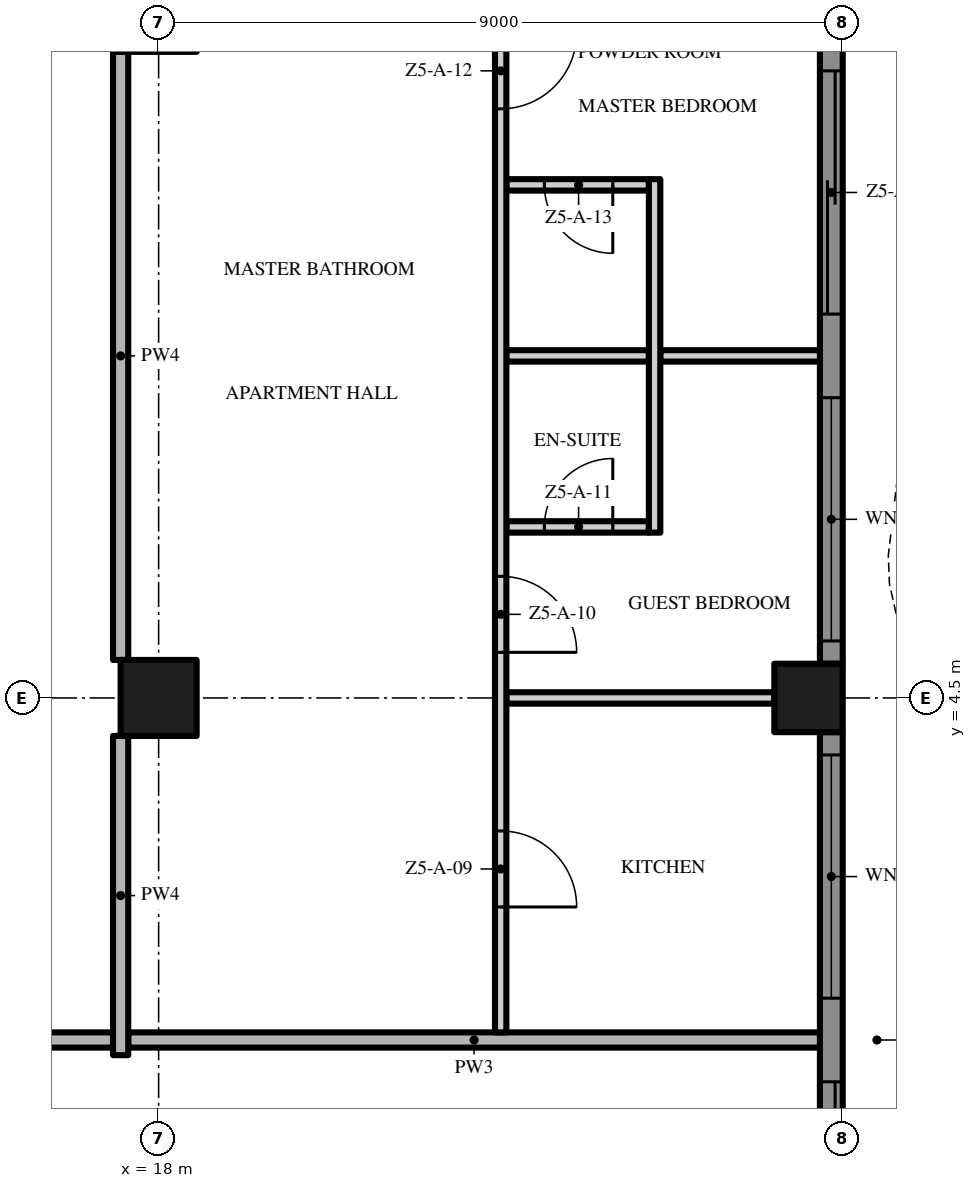
"""IFC4 building model, lengths in metres.
Left out: names, types, materials, properties, quantities, classifications, styles, units other than length and angle.
Written with IfcOpenShell. Run it as: python <this file> out.ifc"""

import sys

from ifc_helpers import new_model, si_unit, direction, frame, frame_2d, origin, origin_2d, place, context, subcontext, project, spatial, polyline, rectangle, outline, extrude, element, fill, save


model = new_model("IFC4")
c1 = context("Model", 3, precision=1e-05, world=origin(), true_north=direction((0.0, 1.0)))
c2 = subcontext(c1, "Body", "Model", "MODEL_VIEW")
j1 = project(units=[si_unit("LENGTHUNIT", "METRE"), si_unit("PLANEANGLEUNIT", "RADIAN")], contexts=[c1])
p1 = place(None, origin())
s1 = spatial("IfcSite", under=j1, at=p1, CompositionType="ELEMENT")
p2 = place(p1, origin())
s2 = spatial("IfcBuilding", under=s1, at=p2, CompositionType="ELEMENT")
p3 = place(p2, frame((0.0, 0.0, 246.4)))
s3 = spatial("IfcBuildingStorey", under=s2, at=p3, CompositionType="ELEMENT", Elevation=246.4)
p4 = place(p3, frame((18.0, 4.5, 0.0), z_axis=(0.0, 0.0, 1.0), x_axis=(1.0, 0.0, 0.0)))
e1 = element("IfcColumn", 1, at=p4, inside=s3, PredefinedType="COLUMN", context=c2, shape_type="SweptSolid", body=[
    extrude(rectangle(XDim=1.0, YDim=1.0, at=origin_2d()), origin(), (0.0, 0.0, 1.0), 3.5),
])
p5 = place(p3, frame((26.55, 4.5, 0.0), z_axis=(0.0, 0.0, 1.0), x_axis=(1.0, 0.0, 0.0)))
e2 = element("IfcColumn", 2, at=p5, inside=s3, PredefinedType="COLUMN", context=c2, shape_type="SweptSolid", body=[
    extrude(rectangle(XDim=0.9, YDim=0.9, at=origin_2d()), origin(), (0.0, 0.0, 1.0), 3.5),
])
p6 = place(p3, frame((26.85, 4.05, 0.0), z_axis=(0.0, 0.0, 1.0), x_axis=(0.0, -1.0, 0.0)))
e3 = element("IfcWall", 3, at=p6, inside=s3, PredefinedType="SOLIDWALL", context=c2, shape_type="SweptSolid", body=[
    extrude(rectangle(XDim=8.1, YDim=0.3, at=frame_2d((4.05, 0.0))), origin(), (0.0, 0.0, 1.0), 3.5),
])
p7 = place(p6, frame((4.6, 0.0, 0.0)))
e4 = element("IfcOpeningElement", 4, at=p7, cuts=e3, PredefinedType="OPENING", context=c2, shape_type="SweptSolid", body=[
    extrude(rectangle(XDim=3.2, YDim=2.4, at=frame_2d((1.6, 1.2))), frame((0.0, 0.16, 0.0), z_axis=(0.0, -1.0, 0.0), x_axis=(1.0, 0.0, 0.0)), (0.0, 0.0, 1.0), 0.32),
])
p8 = place(p6, frame((0.3, 0.0, 0.45)))
e5 = element("IfcOpeningElement", 5, at=p8, cuts=e3, PredefinedType="OPENING", context=c2, shape_type="SweptSolid", body=[
    extrude(rectangle(XDim=3.2, YDim=2.65, at=frame_2d((1.6, 1.325))), frame((0.0, 0.16, 0.0), z_axis=(0.0, -1.0, 0.0), x_axis=(1.0, 0.0, 0.0)), (0.0, 0.0, 1.0), 0.32),
])
p9 = place(p3, frame((26.85, 13.05, 0.0), z_axis=(0.0, 0.0, 1.0), x_axis=(0.0, -1.0, 0.0)))
e6 = element("IfcWall", 6, at=p9, inside=s3, PredefinedType="SOLIDWALL", context=c2, shape_type="SweptSolid", body=[
    extrude(rectangle(XDim=8.1, YDim=0.3, at=frame_2d((4.05, 0.0))), origin(), (0.0, 0.0, 1.0), 3.5),
])
p10 = place(p9, frame((4.6, 0.0, 0.45)))
e7 = element("IfcOpeningElement", 7, at=p10, cuts=e6, PredefinedType="OPENING", context=c2, shape_type="SweptSolid", body=[
    extrude(rectangle(XDim=3.2, YDim=2.65, at=frame_2d((1.6, 1.325))), frame((0.0, 0.16, 0.0), z_axis=(0.0, -1.0, 0.0), x_axis=(1.0, 0.0, 0.0)), (0.0, 0.0, 1.0), 0.32),
])
p11 = place(p9, frame((0.3, 0.0, 0.0)))
e8 = element("IfcOpeningElement", 8, at=p11, cuts=e6, PredefinedType="OPENING", context=c2, shape_type="SweptSolid", body=[
    extrude(rectangle(XDim=3.2, YDim=2.4, at=frame_2d((1.6, 1.2))), frame((0.0, 0.16, 0.0), z_axis=(0.0, -1.0, 0.0), x_axis=(1.0, 0.0, 0.0)), (0.0, 0.0, 1.0), 0.32),
])
p12 = place(p3, origin())
e9 = element("IfcWall", 9, at=p12, inside=s3, PredefinedType="USERDEFINED", context=c2, shape_type="SweptSolid", body=[
    extrude(outline(polyline([(29.649, -18.0), (29.985, -16.5), (30.0, -16.125), (29.869, -15.0), (29.345, -13.5), (28.612, -12.0), (27.951, -10.5), (27.615, -9.0), (27.6, -8.625), (27.731, -7.5), (28.255, -6.0), (28.988, -4.5), (29.649, -3.0), (29.985, -1.5), (30.0, -1.125), (29.869, 0.0), (29.345, 1.5), (28.612, 3.0), (27.951, 4.5), (27.615, 6.0), (27.6, 6.375), (27.731, 7.5), (28.255, 9.0), (28.988, 10.5), (29.649, 12.0), (29.985, 13.5), (30.0, 13.875), (29.869, 15.0), (29.345, 16.5), (28.612, 18.0), (28.388, 17.89), (29.114, 16.404), (29.624, 14.944), (29.749, 13.865), (29.736, 13.533), (29.41, 12.079), (28.761, 10.605), (28.024, 9.096), (27.486, 7.556), (27.349, 6.385), (27.366, 5.967), (27.713, 4.421), (28.385, 2.895), (29.114, 1.404), (29.624, -0.056), (29.749, -1.135), (29.736, -1.467), (29.41, -2.921), (28.761, -4.395), (28.024, -5.904), (27.486, -7.444), (27.349, -8.615), (27.366, -9.033), (27.713, -10.579), (28.385, -12.105), (29.114, -13.596), (29.624, -15.056), (29.749, -16.135), (29.736, -16.467), (29.405, -17.945), (29.649, -18.0)])), origin(), (0.0, 0.0, 1.0), 0.9),
])
p13 = place(p3, frame((17.4, 0.0, 0.0), z_axis=(0.0, 0.0, 1.0), x_axis=(-1.0, 0.0, 0.0)))
e10 = element("IfcWall", 10, at=p13, inside=s3, PredefinedType="PARTITIONING", context=c2, shape_type="SweptSolid", body=[
    extrude(rectangle(XDim=34.8, YDim=0.2, at=frame_2d((17.4, 0.0))), origin(), (0.0, 0.0, 1.0), 3.5),
])
p14 = place(p13, frame((25.65, 0.0, 0.0)))
e11 = element("IfcOpeningElement", 11, at=p14, cuts=e10, PredefinedType="OPENING", context=c2, shape_type="SweptSolid", body=[
    extrude(rectangle(XDim=1.5, YDim=2.4, at=frame_2d((0.75, 1.2))), frame((0.0, 0.11, 0.0), z_axis=(0.0, -1.0, 0.0), x_axis=(1.0, 0.0, 0.0)), (0.0, 0.0, 1.0), 0.22),
])
p15 = place(p13, frame((7.65, 0.0, 0.0)))
e12 = element("IfcOpeningElement", 12, at=p15, cuts=e10, PredefinedType="OPENING", context=c2, shape_type="SweptSolid", body=[
    extrude(rectangle(XDim=1.5, YDim=2.4, at=frame_2d((0.75, 1.2))), frame((0.0, 0.11, 0.0), z_axis=(0.0, -1.0, 0.0), x_axis=(1.0, 0.0, 0.0)), (0.0, 0.0, 1.0), 0.22),
])
p16 = place(p3, frame((17.6, 0.0, 0.0), z_axis=(0.0, 0.0, 1.0), x_axis=(1.0, 0.0, 0.0)))
e13 = element("IfcWall", 13, at=p16, inside=s3, PredefinedType="PARTITIONING", context=c2, shape_type="SweptSolid", body=[
    extrude(rectangle(XDim=9.1, YDim=0.2, at=frame_2d((4.55, 0.0))), origin(), (0.0, 0.0, 1.0), 3.5),
])
p17 = place(p3, frame((22.575, 4.5, 0.0), z_axis=(0.0, 0.0, 1.0), x_axis=(1.0, 0.0, 0.0)))
e14 = element("IfcWall", 14, at=p17, inside=s3, PredefinedType="PARTITIONING", context=c2, shape_type="SweptSolid", body=[
    extrude(rectangle(XDim=3.525, YDim=0.15, at=frame_2d((1.762, 0.0))), origin(), (0.0, 0.0, 1.0), 3.5),
])
p18 = place(p3, frame((22.575, 6.75, 0.0), z_axis=(0.0, 0.0, 1.0), x_axis=(1.0, 0.0, 0.0)))
e15 = element("IfcWall", 15, at=p18, inside=s3, PredefinedType="PARTITIONING", context=c2, shape_type="SweptSolid", body=[
    extrude(rectangle(XDim=1.875, YDim=0.15, at=frame_2d((0.938, 0.0))), origin(), (0.0, 0.0, 1.0), 3.5),
])
p19 = place(p18, frame((0.5, 0.0, 0.0)))
e16 = element("IfcOpeningElement", 16, at=p19, cuts=e15, PredefinedType="OPENING", context=c2, shape_type="SweptSolid", body=[
    extrude(rectangle(XDim=0.9, YDim=2.1, at=frame_2d((0.45, 1.05))), frame((0.0, 0.085, 0.0), z_axis=(0.0, -1.0, 0.0), x_axis=(1.0, 0.0, 0.0)), (0.0, 0.0, 1.0), 0.17),
])
p20 = place(p3, frame((22.575, 9.0, 0.0), z_axis=(0.0, 0.0, 1.0), x_axis=(1.0, 0.0, 0.0)))
e17 = element("IfcWall", 17, at=p20, inside=s3, PredefinedType="PARTITIONING", context=c2, shape_type="SweptSolid", body=[
    extrude(rectangle(XDim=1.875, YDim=0.15, at=frame_2d((0.938, 0.0))), origin(), (0.0, 0.0, 1.0), 3.5),
])
p21 = place(p3, frame((24.6, 9.0, 0.0), z_axis=(0.0, 0.0, 1.0), x_axis=(1.0, 0.0, 0.0)))
e18 = element("IfcWall", 18, at=p21, inside=s3, PredefinedType="PARTITIONING", context=c2, shape_type="SweptSolid", body=[
    extrude(rectangle(XDim=2.1, YDim=0.15, at=frame_2d((1.05, 0.0))), origin(), (0.0, 0.0, 1.0), 3.5),
])
p22 = place(p3, frame((24.45, 11.25, 0.0), z_axis=(0.0, 0.0, 1.0), x_axis=(-1.0, 0.0, 0.0)))
e19 = element("IfcWall", 19, at=p22, inside=s3, PredefinedType="PARTITIONING", context=c2, shape_type="SweptSolid", body=[
    extrude(rectangle(XDim=1.875, YDim=0.15, at=frame_2d((0.938, 0.0))), origin(), (0.0, 0.0, 1.0), 3.5),
])
p23 = place(p22, frame((0.475, 0.0, 0.0)))
e20 = element("IfcOpeningElement", 20, at=p23, cuts=e19, PredefinedType="OPENING", context=c2, shape_type="SweptSolid", body=[
    extrude(rectangle(XDim=0.9, YDim=2.1, at=frame_2d((0.45, 1.05))), frame((0.0, 0.085, 0.0), z_axis=(0.0, -1.0, 0.0), x_axis=(1.0, 0.0, 0.0)), (0.0, 0.0, 1.0), 0.17),
])
p24 = place(p3, frame((17.5, -0.2, 0.0), z_axis=(0.0, 0.0, 1.0), x_axis=(0.0, 1.0, 0.0)))
e21 = element("IfcWall", 21, at=p24, inside=s3, PredefinedType="PARTITIONING", context=c2, shape_type="SweptSolid", body=[
    extrude(rectangle(XDim=4.2, YDim=0.2, at=frame_2d((2.1, 0.0))), origin(), (0.0, 0.0, 1.0), 3.5),
])
p25 = place(p3, frame((17.5, 5.0, 0.0), z_axis=(0.0, 0.0, 1.0), x_axis=(0.0, 1.0, 0.0)))
e22 = element("IfcWall", 22, at=p25, inside=s3, PredefinedType="PARTITIONING", context=c2, shape_type="SweptSolid", body=[
    extrude(rectangle(XDim=8.0, YDim=0.2, at=frame_2d((4.0, 0.0))), origin(), (0.0, 0.0, 1.0), 3.5),
])
p26 = place(p3, frame((22.5, 17.55, 0.0), z_axis=(0.0, 0.0, 1.0), x_axis=(0.0, -1.0, 0.0)))
e23 = element("IfcWall", 23, at=p26, inside=s3, PredefinedType="PARTITIONING", context=c2, shape_type="SweptSolid", body=[
    extrude(rectangle(XDim=17.45, YDim=0.15, at=frame_2d((8.725, 0.0))), origin(), (0.0, 0.0, 1.0), 3.5),
])
p27 = place(p26, frame((14.8, 0.0, 0.0)))
e24 = element("IfcOpeningElement", 24, at=p27, cuts=e23, PredefinedType="OPENING", context=c2, shape_type="SweptSolid", body=[
    extrude(rectangle(XDim=1.0, YDim=2.4, at=frame_2d((0.5, 1.2))), frame((0.0, 0.085, 0.0), z_axis=(0.0, -1.0, 0.0), x_axis=(1.0, 0.0, 0.0)), (0.0, 0.0, 1.0), 0.17),
])
p28 = place(p26, frame((11.45, 0.0, 0.0)))
e25 = element("IfcOpeningElement", 25, at=p28, cuts=e23, PredefinedType="OPENING", context=c2, shape_type="SweptSolid", body=[
    extrude(rectangle(XDim=1.0, YDim=2.4, at=frame_2d((0.5, 1.2))), frame((0.0, 0.085, 0.0), z_axis=(0.0, -1.0, 0.0), x_axis=(1.0, 0.0, 0.0)), (0.0, 0.0, 1.0), 0.17),
])
p29 = place(p26, frame((4.3, 0.0, 0.0)))
e26 = element("IfcOpeningElement", 26, at=p29, cuts=e23, PredefinedType="OPENING", context=c2, shape_type="SweptSolid", body=[
    extrude(rectangle(XDim=1.0, YDim=2.4, at=frame_2d((0.5, 1.2))), frame((0.0, 0.085, 0.0), z_axis=(0.0, -1.0, 0.0), x_axis=(1.0, 0.0, 0.0)), (0.0, 0.0, 1.0), 0.17),
])
p30 = place(p3, frame((24.525, 6.675, 0.0), z_axis=(0.0, 0.0, 1.0), x_axis=(0.0, 1.0, 0.0)))
e27 = element("IfcWall", 27, at=p30, inside=s3, PredefinedType="PARTITIONING", context=c2, shape_type="SweptSolid", body=[
    extrude(rectangle(XDim=4.65, YDim=0.15, at=frame_2d((2.325, 0.0))), origin(), (0.0, 0.0, 1.0), 3.5),
])
p31 = place(p7, origin())
e28 = element("IfcDoor", 28, at=p31, inside=s3, OperationType="SINGLE_SWING_LEFT", PredefinedType="DOOR", context=c2, shape_type="SweptSolid", body=[
    extrude(rectangle(XDim=3.2, YDim=2.4, at=frame_2d((1.6, 1.2))), frame((0.0, 0.025, 0.0), z_axis=(0.0, -1.0, 0.0), x_axis=(1.0, 0.0, 0.0)), (0.0, 0.0, 1.0), 0.05),
])
fill(e4, e28)
p32 = place(p8, origin())
e29 = element("IfcWindow", 29, at=p32, inside=s3, PartitioningType="SINGLE_PANEL", PredefinedType="WINDOW", context=c2, shape_type="SweptSolid", body=[
    extrude(rectangle(XDim=3.2, YDim=2.65, at=frame_2d((1.6, 1.325))), frame((0.0, 0.03, 0.0), z_axis=(0.0, -1.0, 0.0), x_axis=(1.0, 0.0, 0.0)), (0.0, 0.0, 1.0), 0.06),
])
fill(e5, e29)
p33 = place(p10, origin())
e30 = element("IfcWindow", 30, at=p33, inside=s3, PartitioningType="SINGLE_PANEL", PredefinedType="WINDOW", context=c2, shape_type="SweptSolid", body=[
    extrude(rectangle(XDim=3.2, YDim=2.65, at=frame_2d((1.6, 1.325))), frame((0.0, 0.03, 0.0), z_axis=(0.0, -1.0, 0.0), x_axis=(1.0, 0.0, 0.0)), (0.0, 0.0, 1.0), 0.06),
])
fill(e7, e30)
p34 = place(p11, origin())
e31 = element("IfcDoor", 31, at=p34, inside=s3, OperationType="SINGLE_SWING_LEFT", PredefinedType="DOOR", context=c2, shape_type="SweptSolid", body=[
    extrude(rectangle(XDim=3.2, YDim=2.4, at=frame_2d((1.6, 1.2))), frame((0.0, 0.025, 0.0), z_axis=(0.0, -1.0, 0.0), x_axis=(1.0, 0.0, 0.0)), (0.0, 0.0, 1.0), 0.05),
])
fill(e8, e31)
p35 = place(p27, origin())
e32 = element("IfcDoor", 32, at=p35, inside=s3, OperationType="SINGLE_SWING_RIGHT", PredefinedType="DOOR", context=c2, shape_type="SweptSolid", body=[
    extrude(rectangle(XDim=1.0, YDim=2.4, at=frame_2d((0.5, 1.2))), frame((0.0, 0.025, 0.0), z_axis=(0.0, -1.0, 0.0), x_axis=(1.0, 0.0, 0.0)), (0.0, 0.0, 1.0), 0.05),
])
fill(e24, e32)
p36 = place(p28, origin())
e33 = element("IfcDoor", 33, at=p36, inside=s3, OperationType="SINGLE_SWING_RIGHT", PredefinedType="DOOR", context=c2, shape_type="SweptSolid", body=[
    extrude(rectangle(XDim=1.0, YDim=2.4, at=frame_2d((0.5, 1.2))), frame((0.0, 0.025, 0.0), z_axis=(0.0, -1.0, 0.0), x_axis=(1.0, 0.0, 0.0)), (0.0, 0.0, 1.0), 0.05),
])
fill(e25, e33)
p37 = place(p19, origin())
e34 = element("IfcDoor", 34, at=p37, inside=s3, OperationType="SINGLE_SWING_RIGHT", PredefinedType="DOOR", context=c2, shape_type="SweptSolid", body=[
    extrude(rectangle(XDim=0.9, YDim=2.1, at=frame_2d((0.45, 1.05))), frame((0.0, 0.025, 0.0), z_axis=(0.0, -1.0, 0.0), x_axis=(1.0, 0.0, 0.0)), (0.0, 0.0, 1.0), 0.05),
])
fill(e16, e34)
p38 = place(p29, origin())
e35 = element("IfcDoor", 35, at=p38, inside=s3, OperationType="SINGLE_SWING_LEFT", PredefinedType="DOOR", context=c2, shape_type="SweptSolid", body=[
    extrude(rectangle(XDim=1.0, YDim=2.4, at=frame_2d((0.5, 1.2))), frame((0.0, 0.025, 0.0), z_axis=(0.0, -1.0, 0.0), x_axis=(1.0, 0.0, 0.0)), (0.0, 0.0, 1.0), 0.05),
])
fill(e26, e35)
p39 = place(p23, origin())
e36 = element("IfcDoor", 36, at=p39, inside=s3, OperationType="SINGLE_SWING_LEFT", PredefinedType="DOOR", context=c2, shape_type="SweptSolid", body=[
    extrude(rectangle(XDim=0.9, YDim=2.1, at=frame_2d((0.45, 1.05))), frame((0.0, 0.025, 0.0), z_axis=(0.0, -1.0, 0.0), x_axis=(1.0, 0.0, 0.0)), (0.0, 0.0, 1.0), 0.05),
])
fill(e20, e36)
save(model, sys.argv[1])
